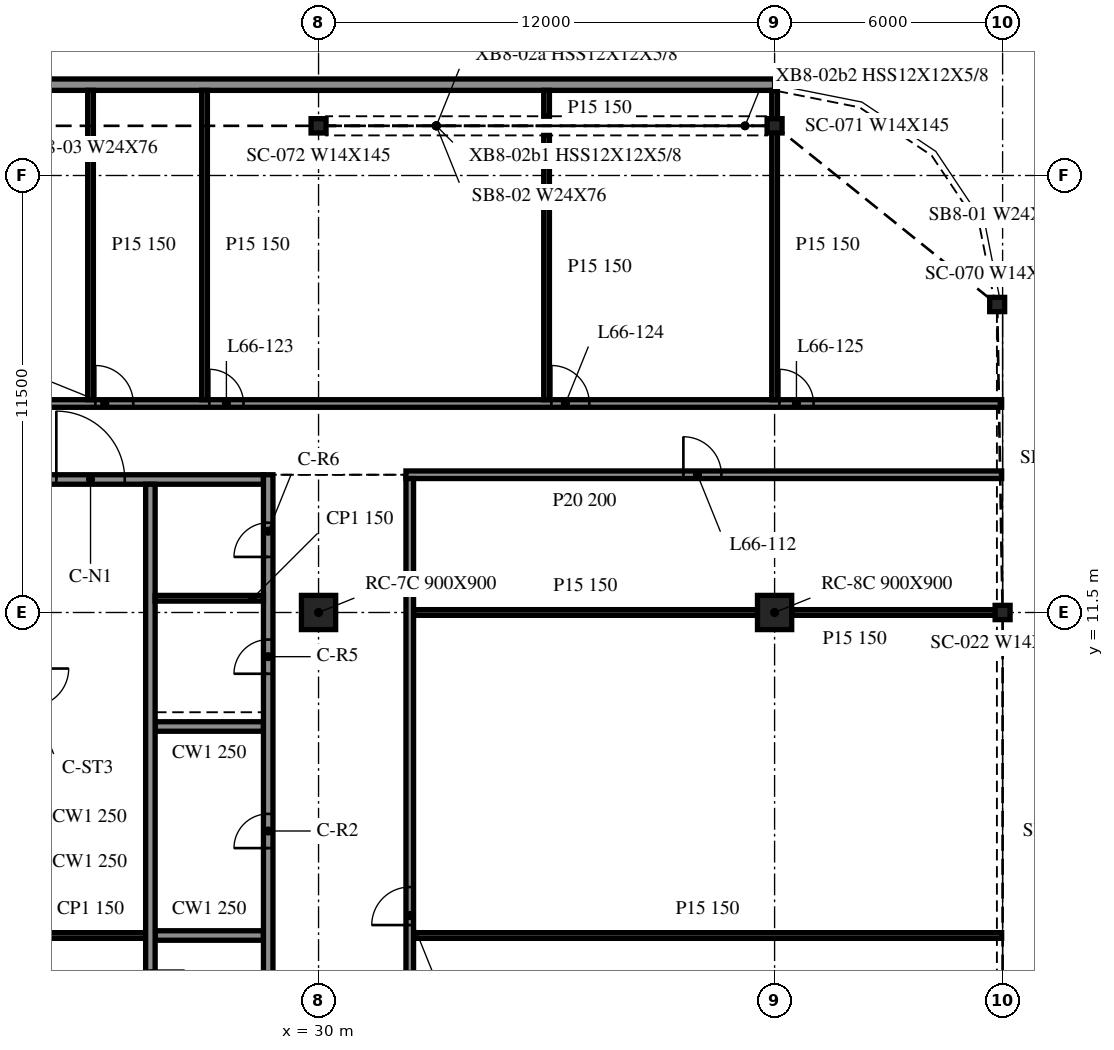
"""IFC4 building model, lengths in metres.
Left out: names, types, materials, properties, quantities, classifications, styles, units other than length and angle.
Written with IfcOpenShell. Run it as: python <this file> out.ifc"""

import sys

from ifc_helpers import new_model, si_unit, direction, frame, frame_2d, origin, origin_2d, place, context, subcontext, project, spatial, rectangle, i_section, extrude, element, fill, save


model = new_model("IFC4")
c1 = context("Model", 3, precision=1e-05, world=origin(), true_north=direction((0.0, 1.0)))
c2 = subcontext(c1, "Body", "Model", "MODEL_VIEW")
j1 = project(units=[si_unit("LENGTHUNIT", "METRE"), si_unit("PLANEANGLEUNIT", "RADIAN")], contexts=[c1])
p1 = place(None, origin())
s1 = spatial("IfcSite", under=j1, at=p1, CompositionType="ELEMENT")
p2 = place(p1, origin())
s2 = spatial("IfcBuilding", under=s1, at=p2, CompositionType="ELEMENT")
p3 = place(p2, frame((0.0, 0.0, 270.9)))
s3 = spatial("IfcBuildingStorey", under=s2, at=p3, CompositionType="ELEMENT", Elevation=270.9)
for number, where, z_axis, x_axis in (
    (1, (30.0, 11.5, -0.34), (0.0, 0.0, 1.0), (1.0, 0.0, 0.0)),
    (2, (42.0, 11.5, -0.34), (0.0, 0.0, 1.0), (1.0, 0.0, 0.0)),
):
    element("IfcColumn", number, at=place(p3, frame(where, z_axis=z_axis, x_axis=x_axis)), inside=s3, PredefinedType="COLUMN", context=c2, shape_type="SweptSolid", body=[
        extrude(rectangle(XDim=0.9, YDim=0.9, at=origin_2d()), origin(), (0.0, 0.0, 1.0), 3.8),
    ])
for number, where, z_axis, x_axis in (
    (3, (47.857, 19.605, -0.34), (0.0, 0.0, 1.0), (1.0, 0.0, 0.0)),
    (4, (42.0, 24.307, -0.34), (0.0, 0.0, 1.0), (1.0, 0.0, 0.0)),
    (5, (30.0, 24.307, -0.34), (0.0, 0.0, 1.0), (1.0, 0.0, 0.0)),
    (6, (48.0, 11.5, -0.34), (0.0, 0.0, 1.0), (1.0, 0.0, 0.0)),
):
    element("IfcColumn", number, at=place(p3, frame(where, z_axis=z_axis, x_axis=x_axis)), inside=s3, PredefinedType="COLUMN", context=c2, shape_type="SweptSolid", body=[
        extrude(i_section(OverallWidth=0.394, OverallDepth=0.376, WebThickness=0.017, FlangeThickness=0.028, at=origin_2d()), origin(), (0.0, 0.0, 1.0), 3.8),
    ])
p4 = place(p3, frame((42.0, 25.39, 0.0), z_axis=(0.0, 0.0, 1.0), x_axis=(-1.0, 0.0, 0.0)))
e7 = element("IfcWall", 7, at=p4, inside=s3, PredefinedType="NOTDEFINED", context=c2, shape_type="SweptSolid", body=[
    extrude(rectangle(XDim=84.0, YDim=0.3, at=frame_2d((42.0, 0.0))), origin(), (0.0, 0.0, 1.0), 2.853),
])
p5 = place(p3, frame((28.675, -9.125, 0.0), z_axis=(0.0, 0.0, 1.0), x_axis=(0.0, 1.0, 0.0)))
e8 = element("IfcWall", 8, at=p5, inside=s3, PredefinedType="SOLIDWALL", context=c2, shape_type="SweptSolid", body=[
    extrude(rectangle(XDim=24.25, YDim=0.25, at=frame_2d((12.125, 0.0))), origin(), (0.0, 0.0, 1.0), 3.46),
])
p6 = place(p5, frame((14.425, 0.0, 0.0)))
e9 = element("IfcOpeningElement", 9, at=p6, cuts=e8, PredefinedType="OPENING", context=c2, shape_type="SweptSolid", body=[
    extrude(rectangle(XDim=0.9, YDim=2.1, at=frame_2d((0.45, 1.05))), frame((0.0, 0.135, 0.0), z_axis=(0.0, -1.0, 0.0), x_axis=(1.0, 0.0, 0.0)), (0.0, 0.0, 1.0), 0.27),
])
p7 = place(p5, frame((19.012, 0.0, 0.0)))
e10 = element("IfcOpeningElement", 10, at=p7, cuts=e8, PredefinedType="OPENING", context=c2, shape_type="SweptSolid", body=[
    extrude(rectangle(XDim=0.9, YDim=2.1, at=frame_2d((0.45, 1.05))), frame((0.0, 0.135, 0.0), z_axis=(0.0, -1.0, 0.0), x_axis=(1.0, 0.0, 0.0)), (0.0, 0.0, 1.0), 0.27),
])
p8 = place(p5, frame((22.087, 0.0, 0.0)))
e11 = element("IfcOpeningElement", 11, at=p8, cuts=e8, PredefinedType="OPENING", context=c2, shape_type="SweptSolid", body=[
    extrude(rectangle(XDim=0.9, YDim=2.1, at=frame_2d((0.45, 1.05))), frame((0.0, 0.135, 0.0), z_axis=(0.0, -1.0, 0.0), x_axis=(1.0, 0.0, 0.0)), (0.0, 0.0, 1.0), 0.27),
])
p9 = place(p3, frame((19.45, 15.0, 0.0), z_axis=(0.0, 0.0, 1.0), x_axis=(1.0, 0.0, 0.0)))
e12 = element("IfcWall", 12, at=p9, inside=s3, PredefinedType="SOLIDWALL", context=c2, shape_type="SweptSolid", body=[
    extrude(rectangle(XDim=9.1, YDim=0.25, at=frame_2d((4.55, 0.0))), origin(), (0.0, 0.0, 1.0), 3.46),
])
p10 = place(p9, frame((3.65, 0.0, 0.0)))
e13 = element("IfcOpeningElement", 13, at=p10, cuts=e12, PredefinedType="OPENING", context=c2, shape_type="SweptSolid", body=[
    extrude(rectangle(XDim=1.8, YDim=2.1, at=frame_2d((0.9, 1.05))), frame((0.0, 0.135, 0.0), z_axis=(0.0, -1.0, 0.0), x_axis=(1.0, 0.0, 0.0)), (0.0, 0.0, 1.0), 0.27),
])
p11 = place(p3, frame((25.575, 14.875, 0.0), z_axis=(0.0, 0.0, 1.0), x_axis=(0.0, -1.0, 0.0)))
e14 = element("IfcWall", 14, at=p11, inside=s3, PredefinedType="SOLIDWALL", context=c2, shape_type="SweptSolid", body=[
    extrude(rectangle(XDim=17.5, YDim=0.25, at=frame_2d((8.75, 0.0))), origin(), (0.0, 0.0, 1.0), 3.46),
])
p12 = place(p11, frame((15.45, 0.0, 0.0)))
e15 = element("IfcOpeningElement", 15, at=p12, cuts=e14, PredefinedType="OPENING", context=c2, shape_type="SweptSolid", body=[
    extrude(rectangle(XDim=1.1, YDim=2.1, at=frame_2d((0.55, 1.05))), frame((0.0, 0.135, 0.0), z_axis=(0.0, -1.0, 0.0), x_axis=(1.0, 0.0, 0.0)), (0.0, 0.0, 1.0), 0.27),
])
p13 = place(p11, frame((12.8, 0.0, 0.0)))
e16 = element("IfcOpeningElement", 16, at=p13, cuts=e14, PredefinedType="OPENING", context=c2, shape_type="SweptSolid", body=[
    extrude(rectangle(XDim=0.9, YDim=2.1, at=frame_2d((0.45, 1.05))), frame((0.0, 0.135, 0.0), z_axis=(0.0, -1.0, 0.0), x_axis=(1.0, 0.0, 0.0)), (0.0, 0.0, 1.0), 0.27),
])
for number, where, z_axis, x_axis in (
    (17, (25.7, 3.0, 0.0), (0.0, 0.0, 1.0), (1.0, 0.0, 0.0)),
    (18, (25.7, 8.5, 0.0), (0.0, 0.0, 1.0), (1.0, 0.0, 0.0)),
):
    element("IfcWall", number, at=place(p3, frame(where, z_axis=z_axis, x_axis=x_axis)), inside=s3, PredefinedType="SOLIDWALL", context=c2, shape_type="SweptSolid", body=[
        extrude(rectangle(XDim=2.85, YDim=0.25, at=frame_2d((1.425, 0.0))), origin(), (0.0, 0.0, 1.0), 3.46),
    ])
p14 = place(p3, frame((22.55, 3.0, 0.0), z_axis=(0.0, 0.0, 1.0), x_axis=(1.0, 0.0, 0.0)))
e19 = element("IfcWall", 19, at=p14, inside=s3, PredefinedType="PARTITIONING", context=c2, shape_type="SweptSolid", body=[
    extrude(rectangle(XDim=2.9, YDim=0.15, at=frame_2d((1.45, 0.0))), origin(), (0.0, 0.0, 1.0), 3.46),
])
p15 = place(p3, frame((25.7, 11.875, 0.0), z_axis=(0.0, 0.0, 1.0), x_axis=(1.0, 0.0, 0.0)))
e20 = element("IfcWall", 20, at=p15, inside=s3, PredefinedType="PARTITIONING", context=c2, shape_type="SweptSolid", body=[
    extrude(rectangle(XDim=2.85, YDim=0.15, at=frame_2d((1.425, 0.0))), origin(), (0.0, 0.0, 1.0), 3.46),
])
p16 = place(p3, frame((32.5, 3.0, 0.0), z_axis=(0.0, 0.0, 1.0), x_axis=(1.0, 0.0, 0.0)))
e21 = element("IfcWall", 21, at=p16, inside=s3, PredefinedType="PARTITIONING", context=c2, shape_type="SweptSolid", body=[
    extrude(rectangle(XDim=15.475, YDim=0.15, at=frame_2d((7.738, 0.0))), origin(), (0.0, 0.0, 1.0), 3.46),
])
p17 = place(p3, frame((32.5, 11.5, 0.0), z_axis=(0.0, 0.0, 1.0), x_axis=(1.0, 0.0, 0.0)))
e22 = element("IfcWall", 22, at=p17, inside=s3, PredefinedType="PARTITIONING", context=c2, shape_type="SweptSolid", body=[
    extrude(rectangle(XDim=9.05, YDim=0.15, at=frame_2d((4.525, 0.0))), origin(), (0.0, 0.0, 1.0), 3.46),
])
p18 = place(p3, frame((42.45, 11.5, 0.0), z_axis=(0.0, 0.0, 1.0), x_axis=(1.0, 0.0, 0.0)))
e23 = element("IfcWall", 23, at=p18, inside=s3, PredefinedType="PARTITIONING", context=c2, shape_type="SweptSolid", body=[
    extrude(rectangle(XDim=5.525, YDim=0.15, at=frame_2d((2.763, 0.0))), origin(), (0.0, 0.0, 1.0), 3.46),
])
p19 = place(p3, frame((32.3, 15.125, 0.0), z_axis=(0.0, 0.0, 1.0), x_axis=(1.0, 0.0, 0.0)))
e24 = element("IfcWall", 24, at=p19, inside=s3, PredefinedType="PARTITIONING", context=c2, shape_type="SweptSolid", body=[
    extrude(rectangle(XDim=15.675, YDim=0.2, at=frame_2d((7.837, 0.0))), origin(), (0.0, 0.0, 1.0), 3.46),
])
p20 = place(p19, frame((7.3, 0.0, 0.0)))
e25 = element("IfcOpeningElement", 25, at=p20, cuts=e24, PredefinedType="OPENING", context=c2, shape_type="SweptSolid", body=[
    extrude(rectangle(XDim=1.0, YDim=2.1, at=frame_2d((0.5, 1.05))), frame((0.0, 0.11, 0.0), z_axis=(0.0, -1.0, 0.0), x_axis=(1.0, 0.0, 0.0)), (0.0, 0.0, 1.0), 0.22),
])
p21 = place(p3, frame((-47.975, 17.0, 0.0), z_axis=(0.0, 0.0, 1.0), x_axis=(1.0, 0.0, 0.0)))
e26 = element("IfcWall", 26, at=p21, inside=s3, PredefinedType="PARTITIONING", context=c2, shape_type="SweptSolid", body=[
    extrude(rectangle(XDim=95.95, YDim=0.2, at=frame_2d((47.975, 0.0))), origin(), (0.0, 0.0, 1.0), 3.46),
])
p22 = place(p21, frame((10.7, 0.0, 0.0)))
e27 = element("IfcOpeningElement", 27, at=p22, cuts=e26, PredefinedType="OPENING", context=c2, shape_type="SweptSolid", body=[
    extrude(rectangle(XDim=0.9, YDim=2.1, at=frame_2d((0.45, 1.05))), frame((0.0, 0.11, 0.0), z_axis=(0.0, -1.0, 0.0), x_axis=(1.0, 0.0, 0.0)), (0.0, 0.0, 1.0), 0.22),
])
p23 = place(p21, frame((13.7, 0.0, 0.0)))
e28 = element("IfcOpeningElement", 28, at=p23, cuts=e26, PredefinedType="OPENING", context=c2, shape_type="SweptSolid", body=[
    extrude(rectangle(XDim=0.9, YDim=2.1, at=frame_2d((0.45, 1.05))), frame((0.0, 0.11, 0.0), z_axis=(0.0, -1.0, 0.0), x_axis=(1.0, 0.0, 0.0)), (0.0, 0.0, 1.0), 0.22),
])
p24 = place(p21, frame((22.5, 0.0, 0.0)))
e29 = element("IfcOpeningElement", 29, at=p24, cuts=e26, PredefinedType="OPENING", context=c2, shape_type="SweptSolid", body=[
    extrude(rectangle(XDim=1.0, YDim=2.1, at=frame_2d((0.5, 1.05))), frame((0.0, 0.11, 0.0), z_axis=(0.0, -1.0, 0.0), x_axis=(1.0, 0.0, 0.0)), (0.0, 0.0, 1.0), 0.22),
])
p25 = place(p21, frame((28.5, 0.0, 0.0)))
e30 = element("IfcOpeningElement", 30, at=p25, cuts=e26, PredefinedType="OPENING", context=c2, shape_type="SweptSolid", body=[
    extrude(rectangle(XDim=1.0, YDim=2.1, at=frame_2d((0.5, 1.05))), frame((0.0, 0.11, 0.0), z_axis=(0.0, -1.0, 0.0), x_axis=(1.0, 0.0, 0.0)), (0.0, 0.0, 1.0), 0.22),
])
p26 = place(p21, frame((40.7, 0.0, 0.0)))
e31 = element("IfcOpeningElement", 31, at=p26, cuts=e26, PredefinedType="OPENING", context=c2, shape_type="SweptSolid", body=[
    extrude(rectangle(XDim=0.9, YDim=2.1, at=frame_2d((0.45, 1.05))), frame((0.0, 0.11, 0.0), z_axis=(0.0, -1.0, 0.0), x_axis=(1.0, 0.0, 0.0)), (0.0, 0.0, 1.0), 0.22),
])
p27 = place(p21, frame((43.5, 0.0, 0.0)))
e32 = element("IfcOpeningElement", 32, at=p27, cuts=e26, PredefinedType="OPENING", context=c2, shape_type="SweptSolid", body=[
    extrude(rectangle(XDim=1.0, YDim=2.1, at=frame_2d((0.5, 1.05))), frame((0.0, 0.11, 0.0), z_axis=(0.0, -1.0, 0.0), x_axis=(1.0, 0.0, 0.0)), (0.0, 0.0, 1.0), 0.22),
])
p28 = place(p21, frame((47.3, 0.0, 0.0)))
e33 = element("IfcOpeningElement", 33, at=p28, cuts=e26, PredefinedType="OPENING", context=c2, shape_type="SweptSolid", body=[
    extrude(rectangle(XDim=0.9, YDim=2.1, at=frame_2d((0.45, 1.05))), frame((0.0, 0.11, 0.0), z_axis=(0.0, -1.0, 0.0), x_axis=(1.0, 0.0, 0.0)), (0.0, 0.0, 1.0), 0.22),
])
p29 = place(p21, frame((54.1, 0.0, 0.0)))
e34 = element("IfcOpeningElement", 34, at=p29, cuts=e26, PredefinedType="OPENING", context=c2, shape_type="SweptSolid", body=[
    extrude(rectangle(XDim=0.9, YDim=2.1, at=frame_2d((0.45, 1.05))), frame((0.0, 0.11, 0.0), z_axis=(0.0, -1.0, 0.0), x_axis=(1.0, 0.0, 0.0)), (0.0, 0.0, 1.0), 0.22),
])
p30 = place(p21, frame((60.1, 0.0, 0.0)))
e35 = element("IfcOpeningElement", 35, at=p30, cuts=e26, PredefinedType="OPENING", context=c2, shape_type="SweptSolid", body=[
    extrude(rectangle(XDim=1.0, YDim=2.1, at=frame_2d((0.5, 1.05))), frame((0.0, 0.11, 0.0), z_axis=(0.0, -1.0, 0.0), x_axis=(1.0, 0.0, 0.0)), (0.0, 0.0, 1.0), 0.22),
])
p31 = place(p21, frame((72.1, 0.0, 0.0)))
e36 = element("IfcOpeningElement", 36, at=p31, cuts=e26, PredefinedType="OPENING", context=c2, shape_type="SweptSolid", body=[
    extrude(rectangle(XDim=1.0, YDim=2.1, at=frame_2d((0.5, 1.05))), frame((0.0, 0.11, 0.0), z_axis=(0.0, -1.0, 0.0), x_axis=(1.0, 0.0, 0.0)), (0.0, 0.0, 1.0), 0.22),
])
p32 = place(p21, frame((75.1, 0.0, 0.0)))
e37 = element("IfcOpeningElement", 37, at=p32, cuts=e26, PredefinedType="OPENING", context=c2, shape_type="SweptSolid", body=[
    extrude(rectangle(XDim=0.9, YDim=2.1, at=frame_2d((0.45, 1.05))), frame((0.0, 0.11, 0.0), z_axis=(0.0, -1.0, 0.0), x_axis=(1.0, 0.0, 0.0)), (0.0, 0.0, 1.0), 0.22),
])
p33 = place(p21, frame((84.1, 0.0, 0.0)))
e38 = element("IfcOpeningElement", 38, at=p33, cuts=e26, PredefinedType="OPENING", context=c2, shape_type="SweptSolid", body=[
    extrude(rectangle(XDim=1.0, YDim=2.1, at=frame_2d((0.5, 1.05))), frame((0.0, 0.11, 0.0), z_axis=(0.0, -1.0, 0.0), x_axis=(1.0, 0.0, 0.0)), (0.0, 0.0, 1.0), 0.22),
])
p34 = place(p21, frame((90.1, 0.0, 0.0)))
e39 = element("IfcOpeningElement", 39, at=p34, cuts=e26, PredefinedType="OPENING", context=c2, shape_type="SweptSolid", body=[
    extrude(rectangle(XDim=0.9, YDim=2.1, at=frame_2d((0.45, 1.05))), frame((0.0, 0.11, 0.0), z_axis=(0.0, -1.0, 0.0), x_axis=(1.0, 0.0, 0.0)), (0.0, 0.0, 1.0), 0.22),
])
for number, where, z_axis, x_axis in (
    (40, (24.0, 17.1, 0.0), (0.0, 0.0, 1.0), (0.0, 1.0, 0.0)),
    (41, (27.0, 17.1, 0.0), (0.0, 0.0, 1.0), (0.0, 1.0, 0.0)),
):
    element("IfcWall", number, at=place(p3, frame(where, z_axis=z_axis, x_axis=x_axis)), inside=s3, PredefinedType="PARTITIONING", context=c2, shape_type="SweptSolid", body=[
        extrude(rectangle(XDim=8.14, YDim=0.15, at=frame_2d((4.07, 0.0))), origin(), (0.0, 0.0, 1.0), 3.46),
    ])
p35 = place(p3, frame((32.4, -9.025, 0.0), z_axis=(0.0, 0.0, 1.0), x_axis=(0.0, 1.0, 0.0)))
e42 = element("IfcWall", 42, at=p35, inside=s3, PredefinedType="PARTITIONING", context=c2, shape_type="SweptSolid", body=[
    extrude(rectangle(XDim=24.05, YDim=0.2, at=frame_2d((12.025, 0.0))), origin(), (0.0, 0.0, 1.0), 3.46),
])
p36 = place(p35, frame((12.3, 0.0, 0.0)))
e43 = element("IfcOpeningElement", 43, at=p36, cuts=e42, PredefinedType="OPENING", context=c2, shape_type="SweptSolid", body=[
    extrude(rectangle(XDim=1.0, YDim=2.1, at=frame_2d((0.5, 1.05))), frame((0.0, 0.11, 0.0), z_axis=(0.0, -1.0, 0.0), x_axis=(1.0, 0.0, 0.0)), (0.0, 0.0, 1.0), 0.22),
])
p37 = place(p3, frame((36.0, 17.1, 0.0), z_axis=(0.0, 0.0, 1.0), x_axis=(0.0, 1.0, 0.0)))
e44 = element("IfcWall", 44, at=p37, inside=s3, PredefinedType="PARTITIONING", context=c2, shape_type="SweptSolid", body=[
    extrude(rectangle(XDim=6.955, YDim=0.15, at=frame_2d((3.477, 0.0))), origin(), (0.0, 0.0, 1.0), 3.46),
])
p38 = place(p3, frame((36.0, 24.559, 0.0), z_axis=(0.0, 0.0, 1.0), x_axis=(0.0, 1.0, 0.0)))
e45 = element("IfcWall", 45, at=p38, inside=s3, PredefinedType="PARTITIONING", context=c2, shape_type="SweptSolid", body=[
    extrude(rectangle(XDim=0.681, YDim=0.15, at=frame_2d((0.34, 0.0))), origin(), (0.0, 0.0, 1.0), 3.46),
])
p39 = place(p3, frame((42.0, 17.1, 0.0), z_axis=(0.0, 0.0, 1.0), x_axis=(0.0, 1.0, 0.0)))
e46 = element("IfcWall", 46, at=p39, inside=s3, PredefinedType="PARTITIONING", context=c2, shape_type="SweptSolid", body=[
    extrude(rectangle(XDim=8.137, YDim=0.15, at=frame_2d((4.068, 0.0))), origin(), (0.0, 0.0, 1.0), 3.46),
])
p40 = place(p10, origin())
e47 = element("IfcDoor", 47, at=p40, inside=s3, OperationType="DOUBLE_DOOR_SINGLE_SWING", PredefinedType="DOOR", context=c2, shape_type="SweptSolid", body=[
    extrude(rectangle(XDim=1.8, YDim=2.1, at=frame_2d((0.9, 1.05))), frame((0.0, 0.025, 0.0), z_axis=(0.0, -1.0, 0.0), x_axis=(1.0, 0.0, 0.0)), (0.0, 0.0, 1.0), 0.05),
])
fill(e13, e47)
p41 = place(p6, origin())
e48 = element("IfcDoor", 48, at=p41, inside=s3, OperationType="SINGLE_SWING_RIGHT", PredefinedType="DOOR", context=c2, shape_type="SweptSolid", body=[
    extrude(rectangle(XDim=0.9, YDim=2.1, at=frame_2d((0.45, 1.05))), frame((0.0, 0.025, 0.0), z_axis=(0.0, -1.0, 0.0), x_axis=(1.0, 0.0, 0.0)), (0.0, 0.0, 1.0), 0.05),
])
fill(e9, e48)
p42 = place(p7, origin())
e49 = element("IfcDoor", 49, at=p42, inside=s3, OperationType="SINGLE_SWING_LEFT", PredefinedType="DOOR", context=c2, shape_type="SweptSolid", body=[
    extrude(rectangle(XDim=0.9, YDim=2.1, at=frame_2d((0.45, 1.05))), frame((0.0, 0.025, 0.0), z_axis=(0.0, -1.0, 0.0), x_axis=(1.0, 0.0, 0.0)), (0.0, 0.0, 1.0), 0.05),
])
fill(e10, e49)
p43 = place(p8, origin())
e50 = element("IfcDoor", 50, at=p43, inside=s3, OperationType="SINGLE_SWING_RIGHT", PredefinedType="DOOR", context=c2, shape_type="SweptSolid", body=[
    extrude(rectangle(XDim=0.9, YDim=2.1, at=frame_2d((0.45, 1.05))), frame((0.0, 0.025, 0.0), z_axis=(0.0, -1.0, 0.0), x_axis=(1.0, 0.0, 0.0)), (0.0, 0.0, 1.0), 0.05),
])
fill(e11, e50)
p44 = place(p36, origin())
e51 = element("IfcDoor", 51, at=p44, inside=s3, OperationType="SINGLE_SWING_LEFT", PredefinedType="DOOR", context=c2, shape_type="SweptSolid", body=[
    extrude(rectangle(XDim=1.0, YDim=2.1, at=frame_2d((0.5, 1.05))), frame((0.0, 0.025, 0.0), z_axis=(0.0, -1.0, 0.0), x_axis=(1.0, 0.0, 0.0)), (0.0, 0.0, 1.0), 0.05),
])
fill(e43, e51)
p45 = place(p20, origin())
e52 = element("IfcDoor", 52, at=p45, inside=s3, OperationType="SINGLE_SWING_LEFT", PredefinedType="DOOR", context=c2, shape_type="SweptSolid", body=[
    extrude(rectangle(XDim=1.0, YDim=2.1, at=frame_2d((0.5, 1.05))), frame((0.0, 0.025, 0.0), z_axis=(0.0, -1.0, 0.0), x_axis=(1.0, 0.0, 0.0)), (0.0, 0.0, 1.0), 0.05),
])
fill(e25, e52)
p46 = place(p31, origin())
e53 = element("IfcDoor", 53, at=p46, inside=s3, OperationType="SINGLE_SWING_RIGHT", PredefinedType="DOOR", context=c2, shape_type="SweptSolid", body=[
    extrude(rectangle(XDim=1.0, YDim=2.1, at=frame_2d((0.5, 1.05))), frame((0.0, 0.025, 0.0), z_axis=(0.0, -1.0, 0.0), x_axis=(1.0, 0.0, 0.0)), (0.0, 0.0, 1.0), 0.05),
])
fill(e36, e53)
p47 = place(p32, origin())
e54 = element("IfcDoor", 54, at=p47, inside=s3, OperationType="SINGLE_SWING_RIGHT", PredefinedType="DOOR", context=c2, shape_type="SweptSolid", body=[
    extrude(rectangle(XDim=0.9, YDim=2.1, at=frame_2d((0.45, 1.05))), frame((0.0, 0.025, 0.0), z_axis=(0.0, -1.0, 0.0), x_axis=(1.0, 0.0, 0.0)), (0.0, 0.0, 1.0), 0.05),
])
fill(e37, e54)
p48 = place(p33, origin())
e55 = element("IfcDoor", 55, at=p48, inside=s3, OperationType="SINGLE_SWING_RIGHT", PredefinedType="DOOR", context=c2, shape_type="SweptSolid", body=[
    extrude(rectangle(XDim=1.0, YDim=2.1, at=frame_2d((0.5, 1.05))), frame((0.0, 0.025, 0.0), z_axis=(0.0, -1.0, 0.0), x_axis=(1.0, 0.0, 0.0)), (0.0, 0.0, 1.0), 0.05),
])
fill(e38, e55)
p49 = place(p34, origin())
e56 = element("IfcDoor", 56, at=p49, inside=s3, OperationType="SINGLE_SWING_RIGHT", PredefinedType="DOOR", context=c2, shape_type="SweptSolid", body=[
    extrude(rectangle(XDim=0.9, YDim=2.1, at=frame_2d((0.45, 1.05))), frame((0.0, 0.025, 0.0), z_axis=(0.0, -1.0, 0.0), x_axis=(1.0, 0.0, 0.0)), (0.0, 0.0, 1.0), 0.05),
])
fill(e39, e56)
save(model, sys.argv[1])
